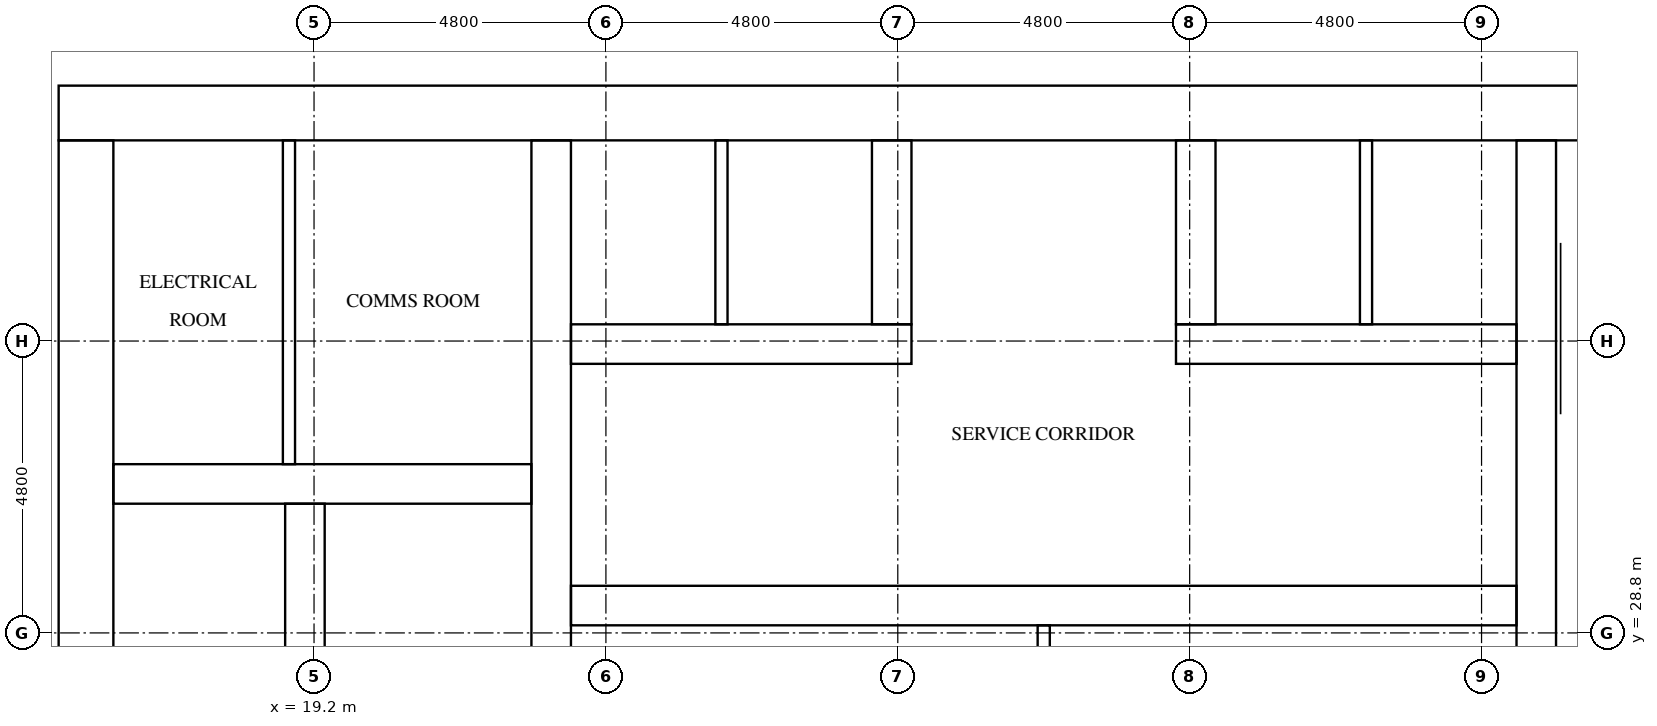
"""IFC4 building model, lengths in metres.
Left out: names, types, materials, properties, quantities, classifications, styles, units other than length and angle.
Written with IfcOpenShell. Run it as: python <this file> out.ifc"""

import sys

from ifc_helpers import new_model, si_unit, direction, frame, frame_2d, origin, place, context, subcontext, project, spatial, rectangle, extrude, element, fill, save


model = new_model("IFC4")
c1 = context("Model", 3, precision=1e-05, world=origin(), true_north=direction((0.0, 1.0)))
c2 = subcontext(c1, "Body", "Model", "MODEL_VIEW")
j1 = project(units=[si_unit("LENGTHUNIT", "METRE"), si_unit("PLANEANGLEUNIT", "RADIAN")], contexts=[c1])
p1 = place(None, origin())
s1 = spatial("IfcSite", under=j1, at=p1, CompositionType="ELEMENT")
p2 = place(p1, origin())
s2 = spatial("IfcBuilding", under=s1, at=p2, CompositionType="ELEMENT")
p3 = place(p2, frame((0.0, 0.0, 106.7)))
s3 = spatial("IfcBuildingStorey", under=s2, at=p3, CompositionType="ELEMENT", Elevation=106.7)
p4 = place(p3, frame((15.0, 37.35, 0.0), z_axis=(0.0, 0.0, 1.0), x_axis=(1.0, 0.0, 0.0)))
e1 = element("IfcWall", 1, at=p4, inside=s3, PredefinedType="SHEAR", context=c2, shape_type="SweptSolid", body=[
    extrude(rectangle(XDim=32.4, YDim=0.9, at=frame_2d((16.2, 0.0))), origin(), (0.0, 0.0, 1.0), 3.2),
])
p5 = place(p4, frame((15.3, 0.0, 0.0)))
e2 = element("IfcOpeningElement", 2, at=p5, cuts=e1, PredefinedType="OPENING", context=c2, shape_type="SweptSolid", body=[
    extrude(rectangle(XDim=1.8, YDim=2.1, at=frame_2d((0.9, 1.05))), frame((0.0, 0.46, 0.0), z_axis=(0.0, -1.0, 0.0), x_axis=(1.0, 0.0, 0.0)), (0.0, 0.0, 1.0), 0.92),
])
p6 = place(p4, frame((1.794, 0.0, 0.0)))
e3 = element("IfcOpeningElement", 3, at=p6, cuts=e1, PredefinedType="OPENING", context=c2, shape_type="SweptSolid", body=[
    extrude(rectangle(XDim=1.0, YDim=2.1, at=frame_2d((0.5, 1.05))), frame((0.0, 0.46, 0.0), z_axis=(0.0, -1.0, 0.0), x_axis=(1.0, 0.0, 0.0)), (0.0, 0.0, 1.0), 0.92),
])
p7 = place(p4, frame((5.331, 0.0, 0.0)))
e4 = element("IfcOpeningElement", 4, at=p7, cuts=e1, PredefinedType="OPENING", context=c2, shape_type="SweptSolid", body=[
    extrude(rectangle(XDim=1.0, YDim=2.1, at=frame_2d((0.5, 1.05))), frame((0.0, 0.46, 0.0), z_axis=(0.0, -1.0, 0.0), x_axis=(1.0, 0.0, 0.0)), (0.0, 0.0, 1.0), 0.92),
])
p8 = place(p3, frame((15.45, 15.9, 0.0), z_axis=(0.0, 0.0, 1.0), x_axis=(0.0, 1.0, 0.0)))
e5 = element("IfcWall", 5, at=p8, inside=s3, PredefinedType="SHEAR", context=c2, shape_type="SweptSolid", body=[
    extrude(rectangle(XDim=21.0, YDim=0.9, at=frame_2d((10.5, 0.0))), origin(), (0.0, 0.0, 1.0), 3.2),
])
p9 = place(p8, frame((4.86, 0.0, 0.0)))
e6 = element("IfcOpeningElement", 6, at=p9, cuts=e5, PredefinedType="OPENING", context=c2, shape_type="SweptSolid", body=[
    extrude(rectangle(XDim=1.2, YDim=2.1, at=frame_2d((0.6, 1.05))), frame((0.0, 0.46, 0.0), z_axis=(0.0, -1.0, 0.0), x_axis=(1.0, 0.0, 0.0)), (0.0, 0.0, 1.0), 0.92),
])
p10 = place(p3, frame((19.05, 15.9, 0.0), z_axis=(0.0, 0.0, 1.0), x_axis=(0.0, 1.0, 0.0)))
e7 = element("IfcWall", 7, at=p10, inside=s3, PredefinedType="SHEAR", context=c2, shape_type="SweptSolid", body=[
    extrude(rectangle(XDim=15.025, YDim=0.65, at=frame_2d((7.513, 0.0))), origin(), (0.0, 0.0, 1.0), 3.2),
])
p11 = place(p10, frame((9.55, 0.0, 0.0)))
e8 = element("IfcOpeningElement", 8, at=p11, cuts=e7, PredefinedType="OPENING", context=c2, shape_type="SweptSolid", body=[
    extrude(rectangle(XDim=1.1, YDim=2.1, at=frame_2d((0.55, 1.05))), frame((0.0, 0.335, 0.0), z_axis=(0.0, -1.0, 0.0), x_axis=(1.0, 0.0, 0.0)), (0.0, 0.0, 1.0), 0.67),
])
p12 = place(p10, frame((13.05, 0.0, 0.0)))
e9 = element("IfcOpeningElement", 9, at=p12, cuts=e7, PredefinedType="OPENING", context=c2, shape_type="SweptSolid", body=[
    extrude(rectangle(XDim=1.1, YDim=2.1, at=frame_2d((0.55, 1.05))), frame((0.0, 0.335, 0.0), z_axis=(0.0, -1.0, 0.0), x_axis=(1.0, 0.0, 0.0)), (0.0, 0.0, 1.0), 0.67),
])
p13 = place(p10, frame((0.3, 0.0, 0.0)))
e10 = element("IfcOpeningElement", 10, at=p13, cuts=e7, PredefinedType="OPENING", context=c2, shape_type="SweptSolid", body=[
    extrude(rectangle(XDim=1.2, YDim=2.1, at=frame_2d((0.6, 1.05))), frame((0.0, 0.335, 0.0), z_axis=(0.0, -1.0, 0.0), x_axis=(1.0, 0.0, 0.0)), (0.0, 0.0, 1.0), 0.67),
])
p14 = place(p3, frame((23.1, 15.9, 0.0), z_axis=(0.0, 0.0, 1.0), x_axis=(0.0, 1.0, 0.0)))
e11 = element("IfcWall", 11, at=p14, inside=s3, PredefinedType="SHEAR", context=c2, shape_type="SweptSolid", body=[
    extrude(rectangle(XDim=21.0, YDim=0.65, at=frame_2d((10.5, 0.0))), origin(), (0.0, 0.0, 1.0), 3.2),
])
p15 = place(p3, frame((39.3, 27.75, 0.0), z_axis=(0.0, 0.0, 1.0), x_axis=(0.0, 1.0, 0.0)))
e12 = element("IfcWall", 12, at=p15, inside=s3, PredefinedType="SHEAR", context=c2, shape_type="SweptSolid", body=[
    extrude(rectangle(XDim=9.15, YDim=0.65, at=frame_2d((4.575, 0.0))), origin(), (0.0, 0.0, 1.0), 3.2),
])
p16 = place(p3, frame((15.9, 31.25, 0.0), z_axis=(0.0, 0.0, 1.0), x_axis=(1.0, 0.0, 0.0)))
e13 = element("IfcWall", 13, at=p16, inside=s3, PredefinedType="SHEAR", context=c2, shape_type="SweptSolid", body=[
    extrude(rectangle(XDim=6.875, YDim=0.65, at=frame_2d((3.438, 0.0))), origin(), (0.0, 0.0, 1.0), 3.2),
])
p17 = place(p3, frame((23.425, 29.25, 0.0), z_axis=(0.0, 0.0, 1.0), x_axis=(1.0, 0.0, 0.0)))
e14 = element("IfcWall", 14, at=p17, inside=s3, PredefinedType="SHEAR", context=c2, shape_type="SweptSolid", body=[
    extrude(rectangle(XDim=15.55, YDim=0.65, at=frame_2d((7.775, 0.0))), origin(), (0.0, 0.0, 1.0), 3.2),
])
p18 = place(p17, frame((3.337, 0.0, 0.0)))
e15 = element("IfcOpeningElement", 15, at=p18, cuts=e14, PredefinedType="OPENING", context=c2, shape_type="SweptSolid", body=[
    extrude(rectangle(XDim=1.0, YDim=2.1, at=frame_2d((0.5, 1.05))), frame((0.0, 0.335, 0.0), z_axis=(0.0, -1.0, 0.0), x_axis=(1.0, 0.0, 0.0)), (0.0, 0.0, 1.0), 0.67),
])
p19 = place(p17, frame((11.212, 0.0, 0.0)))
e16 = element("IfcOpeningElement", 16, at=p19, cuts=e14, PredefinedType="OPENING", context=c2, shape_type="SweptSolid", body=[
    extrude(rectangle(XDim=1.0, YDim=2.1, at=frame_2d((0.5, 1.05))), frame((0.0, 0.335, 0.0), z_axis=(0.0, -1.0, 0.0), x_axis=(1.0, 0.0, 0.0)), (0.0, 0.0, 1.0), 0.67),
])
p20 = place(p3, frame((23.425, 33.55, 0.0), z_axis=(0.0, 0.0, 1.0), x_axis=(1.0, 0.0, 0.0)))
e17 = element("IfcWall", 17, at=p20, inside=s3, PredefinedType="SHEAR", context=c2, shape_type="SweptSolid", body=[
    extrude(rectangle(XDim=5.6, YDim=0.65, at=frame_2d((2.8, 0.0))), origin(), (0.0, 0.0, 1.0), 3.2),
])
p21 = place(p3, frame((33.375, 33.55, 0.0), z_axis=(0.0, 0.0, 1.0), x_axis=(1.0, 0.0, 0.0)))
e18 = element("IfcWall", 18, at=p21, inside=s3, PredefinedType="SHEAR", context=c2, shape_type="SweptSolid", body=[
    extrude(rectangle(XDim=5.6, YDim=0.65, at=frame_2d((2.8, 0.0))), origin(), (0.0, 0.0, 1.0), 3.2),
])
for number, where, z_axis, x_axis in (
    (19, (28.7, 33.875, 0.0), (0.0, 0.0, 1.0), (0.0, 1.0, 0.0)),
    (20, (33.7, 33.875, 0.0), (0.0, 0.0, 1.0), (0.0, 1.0, 0.0)),
):
    element("IfcWall", number, at=place(p3, frame(where, z_axis=z_axis, x_axis=x_axis)), inside=s3, PredefinedType="SHEAR", context=c2, shape_type="SweptSolid", body=[
        extrude(rectangle(XDim=3.025, YDim=0.65, at=frame_2d((1.512, 0.0))), origin(), (0.0, 0.0, 1.0), 3.2),
    ])
for number, where, z_axis, x_axis in (
    (21, (25.9, 33.875, 0.0), (0.0, 0.0, 1.0), (0.0, 1.0, 0.0)),
    (22, (36.5, 33.875, 0.0), (0.0, 0.0, 1.0), (0.0, 1.0, 0.0)),
):
    element("IfcWall", number, at=place(p3, frame(where, z_axis=z_axis, x_axis=x_axis)), inside=s3, PredefinedType="SOLIDWALL", context=c2, shape_type="SweptSolid", body=[
        extrude(rectangle(XDim=3.025, YDim=0.2, at=frame_2d((1.512, 0.0))), origin(), (0.0, 0.0, 1.0), 3.2),
    ])
p22 = place(p3, frame((18.788, 31.575, 0.0), z_axis=(0.0, 0.0, 1.0), x_axis=(0.0, 1.0, 0.0)))
e23 = element("IfcWall", 23, at=p22, inside=s3, PredefinedType="PARTITIONING", context=c2, shape_type="SweptSolid", body=[
    extrude(rectangle(XDim=5.325, YDim=0.2, at=frame_2d((2.663, 0.0))), origin(), (0.0, 0.0, 1.0), 3.2),
])
p23 = place(p3, frame((31.2, 26.475, 0.0), z_axis=(0.0, 0.0, 1.0), x_axis=(0.0, 1.0, 0.0)))
e24 = element("IfcWall", 24, at=p23, inside=s3, PredefinedType="PARTITIONING", context=c2, shape_type="SweptSolid", body=[
    extrude(rectangle(XDim=2.45, YDim=0.2, at=frame_2d((1.225, 0.0))), origin(), (0.0, 0.0, 1.0), 3.2),
])
p24 = place(p12, origin())
e25 = element("IfcDoor", 25, at=p24, inside=s3, OperationType="DOUBLE_DOOR_SLIDING", PredefinedType="DOOR", context=c2, shape_type="SweptSolid", body=[
    extrude(rectangle(XDim=1.1, YDim=2.1, at=frame_2d((0.55, 1.05))), frame((0.0, 0.025, 0.0), z_axis=(0.0, -1.0, 0.0), x_axis=(1.0, 0.0, 0.0)), (0.0, 0.0, 1.0), 0.05),
])
fill(e9, e25)
p25 = place(p5, origin())
e26 = element("IfcDoor", 26, at=p25, inside=s3, OperationType="DOUBLE_DOOR_SINGLE_SWING", PredefinedType="DOOR", context=c2, shape_type="SweptSolid", body=[
    extrude(rectangle(XDim=1.8, YDim=2.1, at=frame_2d((0.9, 1.05))), frame((0.0, 0.025, 0.0), z_axis=(0.0, -1.0, 0.0), x_axis=(1.0, 0.0, 0.0)), (0.0, 0.0, 1.0), 0.05),
])
fill(e2, e26)
p26 = place(p6, origin())
e27 = element("IfcDoor", 27, at=p26, inside=s3, OperationType="SINGLE_SWING_RIGHT", PredefinedType="DOOR", context=c2, shape_type="SweptSolid", body=[
    extrude(rectangle(XDim=1.0, YDim=2.1, at=frame_2d((0.5, 1.05))), frame((0.0, 0.025, 0.0), z_axis=(0.0, -1.0, 0.0), x_axis=(1.0, 0.0, 0.0)), (0.0, 0.0, 1.0), 0.05),
])
fill(e3, e27)
p27 = place(p7, origin())
e28 = element("IfcDoor", 28, at=p27, inside=s3, OperationType="SINGLE_SWING_LEFT", PredefinedType="DOOR", context=c2, shape_type="SweptSolid", body=[
    extrude(rectangle(XDim=1.0, YDim=2.1, at=frame_2d((0.5, 1.05))), frame((0.0, 0.025, 0.0), z_axis=(0.0, -1.0, 0.0), x_axis=(1.0, 0.0, 0.0)), (0.0, 0.0, 1.0), 0.05),
])
fill(e4, e28)
p28 = place(p18, origin())
e29 = element("IfcDoor", 29, at=p28, inside=s3, OperationType="SINGLE_SWING_RIGHT", PredefinedType="DOOR", context=c2, shape_type="SweptSolid", body=[
    extrude(rectangle(XDim=1.0, YDim=2.1, at=frame_2d((0.5, 1.05))), frame((0.0, 0.025, 0.0), z_axis=(0.0, -1.0, 0.0), x_axis=(1.0, 0.0, 0.0)), (0.0, 0.0, 1.0), 0.05),
])
fill(e15, e29)
p29 = place(p19, origin())
e30 = element("IfcDoor", 30, at=p29, inside=s3, OperationType="SINGLE_SWING_LEFT", PredefinedType="DOOR", context=c2, shape_type="SweptSolid", body=[
    extrude(rectangle(XDim=1.0, YDim=2.1, at=frame_2d((0.5, 1.05))), frame((0.0, 0.025, 0.0), z_axis=(0.0, -1.0, 0.0), x_axis=(1.0, 0.0, 0.0)), (0.0, 0.0, 1.0), 0.05),
])
fill(e16, e30)
save(model, sys.argv[1])
